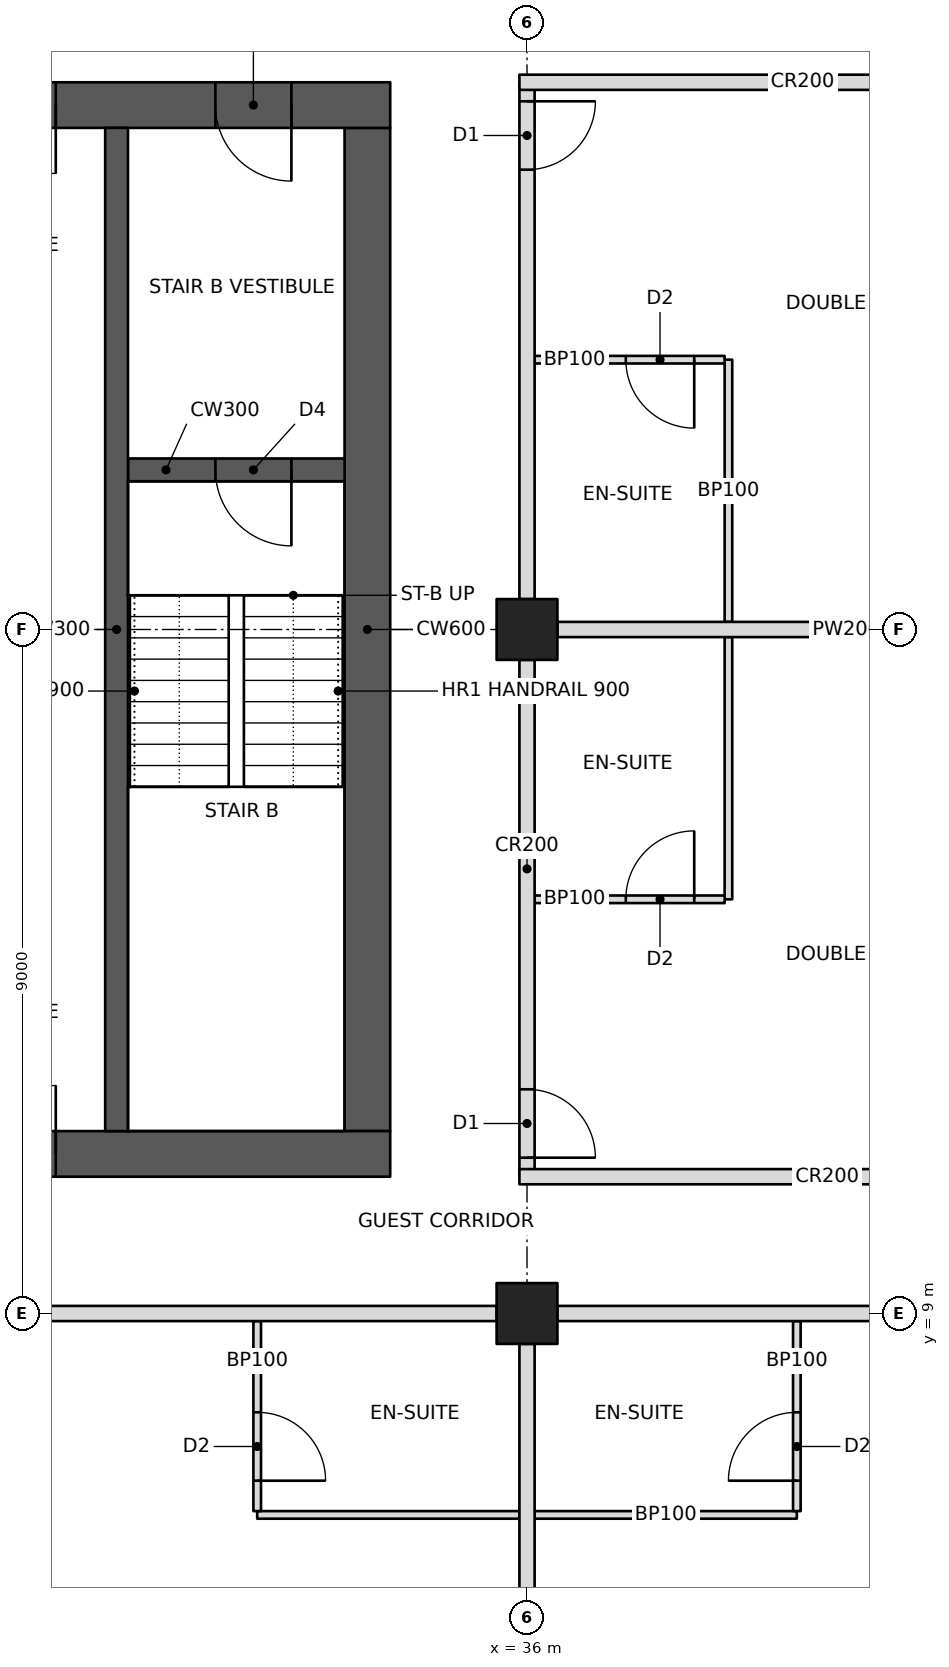
"""IFC4 building model, lengths in metres.
Left out: names, types, materials, properties, quantities, classifications, styles, units other than length and angle.
Written with IfcOpenShell. Run it as: python <this file> out.ifc"""

import sys

from ifc_helpers import new_model, si_unit, direction, frame, frame_2d, origin, origin_2d, place, context, subcontext, project, spatial, rectangle, hollow_rectangle, extrude, element, fill, save


model = new_model("IFC4")
c1 = context("Model", 3, precision=1e-05, world=origin(), true_north=direction((0.0, 1.0)))
c2 = subcontext(c1, "Body", "Model", "MODEL_VIEW")
j1 = project(units=[si_unit("LENGTHUNIT", "METRE"), si_unit("PLANEANGLEUNIT", "RADIAN")], contexts=[c1])
p1 = place(None, origin())
s1 = spatial("IfcSite", under=j1, at=p1, CompositionType="ELEMENT")
p2 = place(p1, origin())
s2 = spatial("IfcBuilding", under=s1, at=p2, CompositionType="ELEMENT")
p3 = place(p2, frame((0.0, 0.0, 187.6)))
s3 = spatial("IfcBuildingStorey", under=s2, at=p3, CompositionType="ELEMENT", Elevation=187.6)
for number, where, z_axis, x_axis in (
    (1, (36.0, 9.0, 0.0), (0.0, 0.0, 1.0), (0.0, 1.0, 0.0)),
    (2, (36.0, 18.0, 0.0), (0.0, 0.0, 1.0), (0.0, 1.0, 0.0)),
):
    element("IfcColumn", number, at=place(p3, frame(where, z_axis=z_axis, x_axis=x_axis)), inside=s3, PredefinedType="COLUMN", context=c2, shape_type="SweptSolid", body=[
        extrude(hollow_rectangle(XDim=0.8, YDim=0.8, WallThickness=0.06, at=origin_2d()), origin(), (0.0, 0.0, 1.0), 3.4),
    ])
p4 = place(p3, frame((10.8, 11.1, 0.0), z_axis=(0.0, 0.0, 1.0), x_axis=(1.0, 0.0, 0.0)))
e3 = element("IfcWall", 3, at=p4, inside=s3, PredefinedType="SHEAR", context=c2, shape_type="SweptSolid", body=[
    extrude(rectangle(XDim=23.4, YDim=0.6, at=frame_2d((11.7, 0.0))), origin(), (0.0, 0.0, 1.0), 3.4),
])
p5 = place(p4, frame((1.0, 0.0, 0.0)))
e4 = element("IfcOpeningElement", 4, at=p5, cuts=e3, PredefinedType="OPENING", context=c2, shape_type="SweptSolid", body=[
    extrude(rectangle(XDim=1.0, YDim=2.1, at=frame_2d((0.5, 1.05))), frame((0.0, 0.31, 0.0), z_axis=(0.0, -1.0, 0.0), x_axis=(1.0, 0.0, 0.0)), (0.0, 0.0, 1.0), 0.62),
])
p6 = place(p4, frame((17.2, 0.0, 0.0)))
e5 = element("IfcOpeningElement", 5, at=p6, cuts=e3, PredefinedType="OPENING", context=c2, shape_type="SweptSolid", body=[
    extrude(rectangle(XDim=1.8, YDim=2.1, at=frame_2d((0.9, 1.05))), frame((0.0, 0.31, 0.0), z_axis=(0.0, -1.0, 0.0), x_axis=(1.0, 0.0, 0.0)), (0.0, 0.0, 1.0), 0.62),
])
p7 = place(p3, frame((10.8, 24.9, 0.0), z_axis=(0.0, 0.0, 1.0), x_axis=(1.0, 0.0, 0.0)))
e6 = element("IfcWall", 6, at=p7, inside=s3, PredefinedType="SHEAR", context=c2, shape_type="SweptSolid", body=[
    extrude(rectangle(XDim=23.4, YDim=0.6, at=frame_2d((11.7, 0.0))), origin(), (0.0, 0.0, 1.0), 3.4),
])
p8 = place(p7, frame((17.2, 0.0, 0.0)))
e7 = element("IfcOpeningElement", 7, at=p8, cuts=e6, PredefinedType="OPENING", context=c2, shape_type="SweptSolid", body=[
    extrude(rectangle(XDim=1.8, YDim=2.1, at=frame_2d((0.9, 1.05))), frame((0.0, 0.31, 0.0), z_axis=(0.0, -1.0, 0.0), x_axis=(1.0, 0.0, 0.0)), (0.0, 0.0, 1.0), 0.62),
])
p9 = place(p7, frame((21.1, 0.0, 0.0)))
e8 = element("IfcOpeningElement", 8, at=p9, cuts=e6, PredefinedType="OPENING", context=c2, shape_type="SweptSolid", body=[
    extrude(rectangle(XDim=1.0, YDim=2.1, at=frame_2d((0.5, 1.05))), frame((0.0, 0.31, 0.0), z_axis=(0.0, -1.0, 0.0), x_axis=(1.0, 0.0, 0.0)), (0.0, 0.0, 1.0), 0.62),
])
p10 = place(p7, frame((4.9, 0.0, 0.0)))
e9 = element("IfcOpeningElement", 9, at=p10, cuts=e6, PredefinedType="OPENING", context=c2, shape_type="SweptSolid", body=[
    extrude(rectangle(XDim=1.0, YDim=2.1, at=frame_2d((0.5, 1.05))), frame((0.0, 0.31, 0.0), z_axis=(0.0, -1.0, 0.0), x_axis=(1.0, 0.0, 0.0)), (0.0, 0.0, 1.0), 0.62),
])
p11 = place(p3, frame((33.9, 11.4, 0.0), z_axis=(0.0, 0.0, 1.0), x_axis=(0.0, 1.0, 0.0)))
e10 = element("IfcWall", 10, at=p11, inside=s3, PredefinedType="SHEAR", context=c2, shape_type="SweptSolid", body=[
    extrude(rectangle(XDim=13.2, YDim=0.6, at=frame_2d((6.6, 0.0))), origin(), (0.0, 0.0, 1.0), 3.4),
])
p12 = place(p3, frame((30.6, 11.4, 0.0), z_axis=(0.0, 0.0, 1.0), x_axis=(0.0, 1.0, 0.0)))
e11 = element("IfcWall", 11, at=p12, inside=s3, PredefinedType="SHEAR", context=c2, shape_type="SweptSolid", body=[
    extrude(rectangle(XDim=13.2, YDim=0.3, at=frame_2d((6.6, 0.0))), origin(), (0.0, 0.0, 1.0), 3.4),
])
p13 = place(p3, frame((30.75, 20.1, 0.0), z_axis=(0.0, 0.0, 1.0), x_axis=(1.0, 0.0, 0.0)))
e12 = element("IfcWall", 12, at=p13, inside=s3, PredefinedType="SHEAR", context=c2, shape_type="SweptSolid", body=[
    extrude(rectangle(XDim=2.85, YDim=0.3, at=frame_2d((1.425, 0.0))), origin(), (0.0, 0.0, 1.0), 3.4),
])
p14 = place(p13, frame((1.15, 0.0, 0.0)))
e13 = element("IfcOpeningElement", 13, at=p14, cuts=e12, PredefinedType="OPENING", context=c2, shape_type="SweptSolid", body=[
    extrude(rectangle(XDim=1.0, YDim=2.1, at=frame_2d((0.5, 1.05))), frame((0.0, 0.16, 0.0), z_axis=(0.0, -1.0, 0.0), x_axis=(1.0, 0.0, 0.0)), (0.0, 0.0, 1.0), 0.32),
])
p15 = place(p3, frame((27.4, 9.0, 0.0), z_axis=(0.0, 0.0, 1.0), x_axis=(1.0, 0.0, 0.0)))
e14 = element("IfcWall", 14, at=p15, inside=s3, PredefinedType="PARTITIONING", context=c2, shape_type="SweptSolid", body=[
    extrude(rectangle(XDim=8.2, YDim=0.2, at=frame_2d((4.1, 0.0))), origin(), (0.0, 0.0, 1.0), 2.405),
])
p16 = place(p15, frame((0.15, 0.0, 0.0)))
e15 = element("IfcOpeningElement", 15, at=p16, cuts=e14, PredefinedType="OPENING", context=c2, shape_type="SweptSolid", body=[
    extrude(rectangle(XDim=0.9, YDim=2.1, at=frame_2d((0.45, 1.05))), frame((0.0, 0.11, 0.0), z_axis=(0.0, -1.0, 0.0), x_axis=(1.0, 0.0, 0.0)), (0.0, 0.0, 1.0), 0.22),
])
p17 = place(p3, frame((36.4, 9.0, 0.0), z_axis=(0.0, 0.0, 1.0), x_axis=(1.0, 0.0, 0.0)))
e16 = element("IfcWall", 16, at=p17, inside=s3, PredefinedType="PARTITIONING", context=c2, shape_type="SweptSolid", body=[
    extrude(rectangle(XDim=7.6, YDim=0.2, at=frame_2d((3.8, 0.0))), origin(), (0.0, 0.0, 1.0), 2.438),
])
p18 = place(p17, frame((6.45, 0.0, 0.0)))
e17 = element("IfcOpeningElement", 17, at=p18, cuts=e16, PredefinedType="OPENING", context=c2, shape_type="SweptSolid", body=[
    extrude(rectangle(XDim=0.9, YDim=2.1, at=frame_2d((0.45, 1.05))), frame((0.0, 0.11, 0.0), z_axis=(0.0, -1.0, 0.0), x_axis=(1.0, 0.0, 0.0)), (0.0, 0.0, 1.0), 0.22),
])
p19 = place(p3, frame((36.0, 10.8, 0.0), z_axis=(0.0, 0.0, 1.0), x_axis=(0.0, 1.0, 0.0)))
e18 = element("IfcWall", 18, at=p19, inside=s3, PredefinedType="PARTITIONING", context=c2, shape_type="SweptSolid", body=[
    extrude(rectangle(XDim=6.8, YDim=0.2, at=frame_2d((3.4, 0.0))), origin(), (0.0, 0.0, 1.0), 2.405),
])
p20 = place(p19, frame((0.25, 0.0, 0.0)))
e19 = element("IfcOpeningElement", 19, at=p20, cuts=e18, PredefinedType="OPENING", context=c2, shape_type="SweptSolid", body=[
    extrude(rectangle(XDim=0.9, YDim=2.1, at=frame_2d((0.45, 1.05))), frame((0.0, 0.11, 0.0), z_axis=(0.0, -1.0, 0.0), x_axis=(1.0, 0.0, 0.0)), (0.0, 0.0, 1.0), 0.22),
])
p21 = place(p3, frame((36.0, 18.4, 0.0), z_axis=(0.0, 0.0, 1.0), x_axis=(0.0, 1.0, 0.0)))
e20 = element("IfcWall", 20, at=p21, inside=s3, PredefinedType="PARTITIONING", context=c2, shape_type="SweptSolid", body=[
    extrude(rectangle(XDim=6.8, YDim=0.2, at=frame_2d((3.4, 0.0))), origin(), (0.0, 0.0, 1.0), 2.405),
])
p22 = place(p21, frame((5.65, 0.0, 0.0)))
e21 = element("IfcOpeningElement", 21, at=p22, cuts=e20, PredefinedType="OPENING", context=c2, shape_type="SweptSolid", body=[
    extrude(rectangle(XDim=0.9, YDim=2.1, at=frame_2d((0.45, 1.05))), frame((0.0, 0.11, 0.0), z_axis=(0.0, -1.0, 0.0), x_axis=(1.0, 0.0, 0.0)), (0.0, 0.0, 1.0), 0.22),
])
p23 = place(p3, frame((35.9, 10.8, 0.0), z_axis=(0.0, 0.0, 1.0), x_axis=(1.0, 0.0, 0.0)))
e22 = element("IfcWall", 22, at=p23, inside=s3, PredefinedType="PARTITIONING", context=c2, shape_type="SweptSolid", body=[
    extrude(rectangle(XDim=8.1, YDim=0.2, at=frame_2d((4.05, 0.0))), origin(), (0.0, 0.0, 1.0), 2.404),
])
p24 = place(p3, frame((35.9, 25.2, 0.0), z_axis=(0.0, 0.0, 1.0), x_axis=(1.0, 0.0, 0.0)))
e23 = element("IfcWall", 23, at=p24, inside=s3, PredefinedType="PARTITIONING", context=c2, shape_type="SweptSolid", body=[
    extrude(rectangle(XDim=7.45, YDim=0.2, at=frame_2d((3.725, 0.0))), origin(), (0.0, 0.0, 1.0), 2.404),
])
p25 = place(p3, frame((36.0, 8.6, 0.0), z_axis=(0.0, 0.0, 1.0), x_axis=(0.0, -1.0, 0.0)))
e24 = element("IfcWall", 24, at=p25, inside=s3, PredefinedType="PARTITIONING", context=c2, shape_type="SweptSolid", body=[
    extrude(rectangle(XDim=7.6, YDim=0.2, at=frame_2d((3.8, 0.0))), origin(), (0.0, 0.0, 1.0), 2.438),
])
p26 = place(p3, frame((32.45, 6.35, 0.0), z_axis=(0.0, 0.0, 1.0), x_axis=(1.0, 0.0, 0.0)))
e25 = element("IfcWall", 25, at=p26, inside=s3, PredefinedType="PARTITIONING", context=c2, shape_type="SweptSolid", body=[
    extrude(rectangle(XDim=3.45, YDim=0.1, at=frame_2d((1.725, 0.0))), origin(), (0.0, 0.0, 1.0), 2.438),
])
p27 = place(p3, frame((32.45, 8.9, 0.0), z_axis=(0.0, 0.0, 1.0), x_axis=(0.0, -1.0, 0.0)))
e26 = element("IfcWall", 26, at=p27, inside=s3, PredefinedType="PARTITIONING", context=c2, shape_type="SweptSolid", body=[
    extrude(rectangle(XDim=2.5, YDim=0.1, at=frame_2d((1.25, 0.0))), origin(), (0.0, 0.0, 1.0), 2.404),
])
p28 = place(p27, frame((1.2, 0.0, 0.0)))
e27 = element("IfcOpeningElement", 27, at=p28, cuts=e26, PredefinedType="OPENING", context=c2, shape_type="SweptSolid", body=[
    extrude(rectangle(XDim=0.9, YDim=2.1, at=frame_2d((0.45, 1.05))), frame((0.0, 0.06, 0.0), z_axis=(0.0, -1.0, 0.0), x_axis=(1.0, 0.0, 0.0)), (0.0, 0.0, 1.0), 0.12),
])
p29 = place(p3, frame((36.1, 6.35, 0.0), z_axis=(0.0, 0.0, 1.0), x_axis=(1.0, 0.0, 0.0)))
e28 = element("IfcWall", 28, at=p29, inside=s3, PredefinedType="PARTITIONING", context=c2, shape_type="SweptSolid", body=[
    extrude(rectangle(XDim=3.45, YDim=0.1, at=frame_2d((1.725, 0.0))), origin(), (0.0, 0.0, 1.0), 2.438),
])
p30 = place(p3, frame((39.55, 8.9, 0.0), z_axis=(0.0, 0.0, 1.0), x_axis=(0.0, -1.0, 0.0)))
e29 = element("IfcWall", 29, at=p30, inside=s3, PredefinedType="PARTITIONING", context=c2, shape_type="SweptSolid", body=[
    extrude(rectangle(XDim=2.5, YDim=0.1, at=frame_2d((1.25, 0.0))), origin(), (0.0, 0.0, 1.0), 2.438),
])
p31 = place(p30, frame((1.2, 0.0, 0.0)))
e30 = element("IfcOpeningElement", 30, at=p31, cuts=e29, PredefinedType="OPENING", context=c2, shape_type="SweptSolid", body=[
    extrude(rectangle(XDim=0.9, YDim=2.1, at=frame_2d((0.45, 1.05))), frame((0.0, 0.06, 0.0), z_axis=(0.0, -1.0, 0.0), x_axis=(1.0, 0.0, 0.0)), (0.0, 0.0, 1.0), 0.12),
])
p32 = place(p3, frame((36.4, 18.0, 0.0), z_axis=(0.0, 0.0, 1.0), x_axis=(1.0, 0.0, 0.0)))
e31 = element("IfcWall", 31, at=p32, inside=s3, PredefinedType="PARTITIONING", context=c2, shape_type="SweptSolid", body=[
    extrude(rectangle(XDim=7.6, YDim=0.2, at=frame_2d((3.8, 0.0))), origin(), (0.0, 0.0, 1.0), 2.405),
])
p33 = place(p3, frame((38.65, 14.45, 0.0), z_axis=(0.0, 0.0, 1.0), x_axis=(0.0, 1.0, 0.0)))
e32 = element("IfcWall", 32, at=p33, inside=s3, PredefinedType="PARTITIONING", context=c2, shape_type="SweptSolid", body=[
    extrude(rectangle(XDim=3.45, YDim=0.1, at=frame_2d((1.725, 0.0))), origin(), (0.0, 0.0, 1.0), 2.404),
])
p34 = place(p3, frame((36.1, 14.45, 0.0), z_axis=(0.0, 0.0, 1.0), x_axis=(1.0, 0.0, 0.0)))
e33 = element("IfcWall", 33, at=p34, inside=s3, PredefinedType="PARTITIONING", context=c2, shape_type="SweptSolid", body=[
    extrude(rectangle(XDim=2.5, YDim=0.1, at=frame_2d((1.25, 0.0))), origin(), (0.0, 0.0, 1.0), 2.404),
])
p35 = place(p34, frame((1.2, 0.0, 0.0)))
e34 = element("IfcOpeningElement", 34, at=p35, cuts=e33, PredefinedType="OPENING", context=c2, shape_type="SweptSolid", body=[
    extrude(rectangle(XDim=0.9, YDim=2.1, at=frame_2d((0.45, 1.05))), frame((0.0, 0.06, 0.0), z_axis=(0.0, -1.0, 0.0), x_axis=(1.0, 0.0, 0.0)), (0.0, 0.0, 1.0), 0.12),
])
p36 = place(p3, frame((38.65, 18.1, 0.0), z_axis=(0.0, 0.0, 1.0), x_axis=(0.0, 1.0, 0.0)))
e35 = element("IfcWall", 35, at=p36, inside=s3, PredefinedType="PARTITIONING", context=c2, shape_type="SweptSolid", body=[
    extrude(rectangle(XDim=3.45, YDim=0.1, at=frame_2d((1.725, 0.0))), origin(), (0.0, 0.0, 1.0), 2.404),
])
p37 = place(p3, frame((36.1, 21.55, 0.0), z_axis=(0.0, 0.0, 1.0), x_axis=(1.0, 0.0, 0.0)))
e36 = element("IfcWall", 36, at=p37, inside=s3, PredefinedType="PARTITIONING", context=c2, shape_type="SweptSolid", body=[
    extrude(rectangle(XDim=2.5, YDim=0.1, at=frame_2d((1.25, 0.0))), origin(), (0.0, 0.0, 1.0), 2.404),
])
p38 = place(p37, frame((1.2, 0.0, 0.0)))
e37 = element("IfcOpeningElement", 37, at=p38, cuts=e36, PredefinedType="OPENING", context=c2, shape_type="SweptSolid", body=[
    extrude(rectangle(XDim=0.9, YDim=2.1, at=frame_2d((0.45, 1.05))), frame((0.0, 0.06, 0.0), z_axis=(0.0, -1.0, 0.0), x_axis=(1.0, 0.0, 0.0)), (0.0, 0.0, 1.0), 0.12),
])
p39 = place(p28, origin())
e38 = element("IfcDoor", 38, at=p39, inside=s3, OperationType="SINGLE_SWING_RIGHT", PredefinedType="DOOR", context=c2, shape_type="SweptSolid", body=[
    extrude(rectangle(XDim=0.9, YDim=2.1, at=frame_2d((0.45, 1.05))), frame((0.0, 0.025, 0.0), z_axis=(0.0, -1.0, 0.0), x_axis=(1.0, 0.0, 0.0)), (0.0, 0.0, 1.0), 0.05),
])
fill(e27, e38)
p40 = place(p31, frame((0.9, 0.0, 0.0), z_axis=(0.0, 0.0, 1.0), x_axis=(-1.0, 0.0, 0.0)))
e39 = element("IfcDoor", 39, at=p40, inside=s3, OperationType="SINGLE_SWING_LEFT", PredefinedType="DOOR", context=c2, shape_type="SweptSolid", body=[
    extrude(rectangle(XDim=0.9, YDim=2.1, at=frame_2d((0.45, 1.05))), frame((0.0, 0.025, 0.0), z_axis=(0.0, -1.0, 0.0), x_axis=(1.0, 0.0, 0.0)), (0.0, 0.0, 1.0), 0.05),
])
fill(e30, e39)
p41 = place(p35, origin())
e40 = element("IfcDoor", 40, at=p41, inside=s3, OperationType="SINGLE_SWING_RIGHT", PredefinedType="DOOR", context=c2, shape_type="SweptSolid", body=[
    extrude(rectangle(XDim=0.9, YDim=2.1, at=frame_2d((0.45, 1.05))), frame((0.0, 0.025, 0.0), z_axis=(0.0, -1.0, 0.0), x_axis=(1.0, 0.0, 0.0)), (0.0, 0.0, 1.0), 0.05),
])
fill(e34, e40)
p42 = place(p20, frame((0.9, 0.0, 0.0), z_axis=(0.0, 0.0, 1.0), x_axis=(-1.0, 0.0, 0.0)))
e41 = element("IfcDoor", 41, at=p42, inside=s3, OperationType="SINGLE_SWING_RIGHT", PredefinedType="DOOR", context=c2, shape_type="SweptSolid", body=[
    extrude(rectangle(XDim=0.9, YDim=2.1, at=frame_2d((0.45, 1.05))), frame((0.0, 0.025, 0.0), z_axis=(0.0, -1.0, 0.0), x_axis=(1.0, 0.0, 0.0)), (0.0, 0.0, 1.0), 0.05),
])
fill(e19, e41)
p43 = place(p38, frame((0.9, 0.0, 0.0), z_axis=(0.0, 0.0, 1.0), x_axis=(-1.0, 0.0, 0.0)))
e42 = element("IfcDoor", 42, at=p43, inside=s3, OperationType="SINGLE_SWING_LEFT", PredefinedType="DOOR", context=c2, shape_type="SweptSolid", body=[
    extrude(rectangle(XDim=0.9, YDim=2.1, at=frame_2d((0.45, 1.05))), frame((0.0, 0.025, 0.0), z_axis=(0.0, -1.0, 0.0), x_axis=(1.0, 0.0, 0.0)), (0.0, 0.0, 1.0), 0.05),
])
fill(e37, e42)
p44 = place(p22, frame((0.9, 0.0, 0.0), z_axis=(0.0, 0.0, 1.0), x_axis=(-1.0, 0.0, 0.0)))
e43 = element("IfcDoor", 43, at=p44, inside=s3, OperationType="SINGLE_SWING_LEFT", PredefinedType="DOOR", context=c2, shape_type="SweptSolid", body=[
    extrude(rectangle(XDim=0.9, YDim=2.1, at=frame_2d((0.45, 1.05))), frame((0.0, 0.025, 0.0), z_axis=(0.0, -1.0, 0.0), x_axis=(1.0, 0.0, 0.0)), (0.0, 0.0, 1.0), 0.05),
])
fill(e21, e43)
p45 = place(p6, origin())
e44 = element("IfcDoor", 44, at=p45, inside=s3, OperationType="DOUBLE_DOOR_SINGLE_SWING", PredefinedType="DOOR", context=c2, shape_type="SweptSolid", body=[
    extrude(rectangle(XDim=1.8, YDim=2.1, at=frame_2d((0.9, 1.05))), frame((0.0, 0.025, 0.0), z_axis=(0.0, -1.0, 0.0), x_axis=(1.0, 0.0, 0.0)), (0.0, 0.0, 1.0), 0.05),
])
fill(e5, e44)
p46 = place(p8, frame((1.8, 0.0, 0.0), z_axis=(0.0, 0.0, 1.0), x_axis=(-1.0, 0.0, 0.0)))
e45 = element("IfcDoor", 45, at=p46, inside=s3, OperationType="DOUBLE_DOOR_SINGLE_SWING", PredefinedType="DOOR", context=c2, shape_type="SweptSolid", body=[
    extrude(rectangle(XDim=1.8, YDim=2.1, at=frame_2d((0.9, 1.05))), frame((0.0, 0.025, 0.0), z_axis=(0.0, -1.0, 0.0), x_axis=(1.0, 0.0, 0.0)), (0.0, 0.0, 1.0), 0.05),
])
fill(e7, e45)
p47 = place(p9, frame((1.0, 0.0, 0.0), z_axis=(0.0, 0.0, 1.0), x_axis=(-1.0, 0.0, 0.0)))
e46 = element("IfcDoor", 46, at=p47, inside=s3, OperationType="SINGLE_SWING_LEFT", PredefinedType="DOOR", context=c2, shape_type="SweptSolid", body=[
    extrude(rectangle(XDim=1.0, YDim=2.1, at=frame_2d((0.5, 1.05))), frame((0.0, 0.025, 0.0), z_axis=(0.0, -1.0, 0.0), x_axis=(1.0, 0.0, 0.0)), (0.0, 0.0, 1.0), 0.05),
])
fill(e8, e46)
p48 = place(p14, frame((1.0, 0.0, 0.0), z_axis=(0.0, 0.0, 1.0), x_axis=(-1.0, 0.0, 0.0)))
e47 = element("IfcDoor", 47, at=p48, inside=s3, OperationType="SINGLE_SWING_LEFT", PredefinedType="DOOR", context=c2, shape_type="SweptSolid", body=[
    extrude(rectangle(XDim=1.0, YDim=2.1, at=frame_2d((0.5, 1.05))), frame((0.0, 0.025, 0.0), z_axis=(0.0, -1.0, 0.0), x_axis=(1.0, 0.0, 0.0)), (0.0, 0.0, 1.0), 0.05),
])
fill(e13, e47)
save(model, sys.argv[1])
